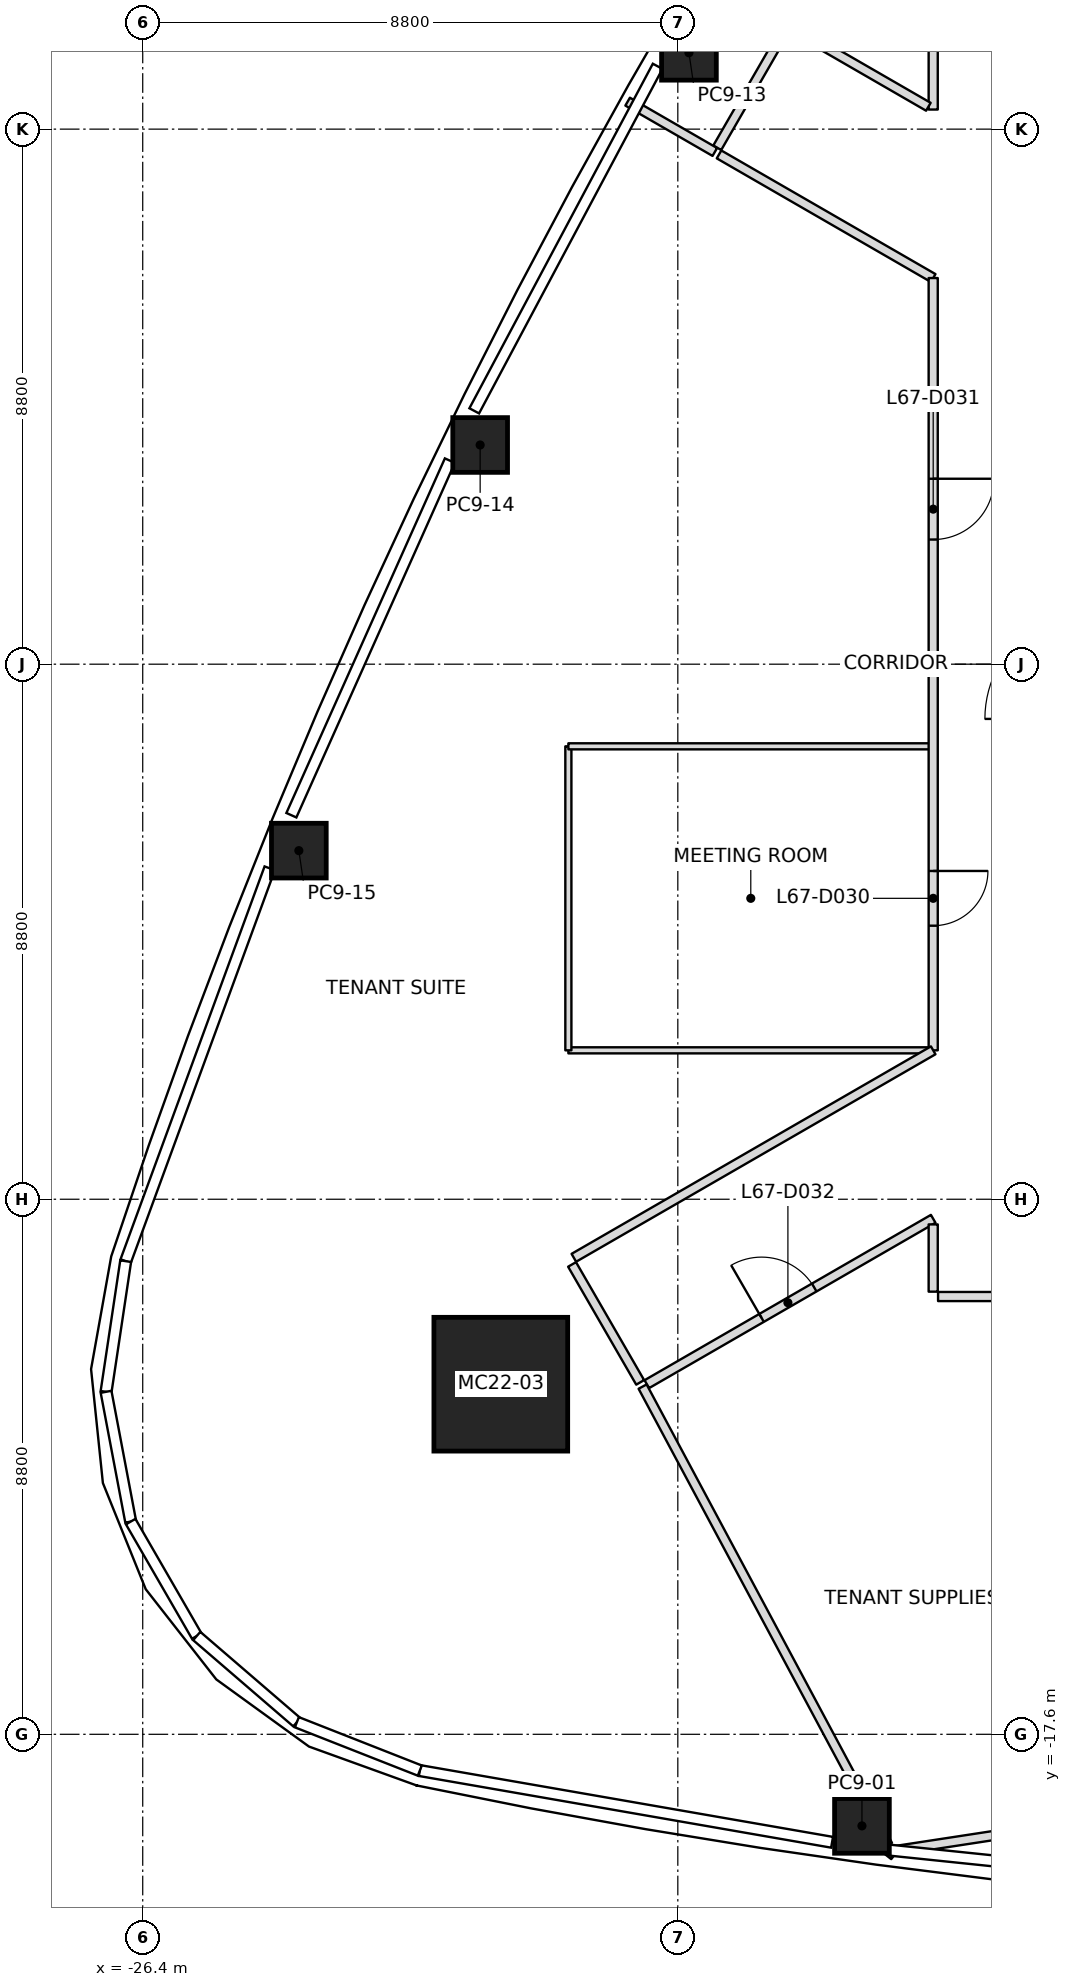
"""IFC4 building model, lengths in metres.
Left out: names, types, materials, properties, quantities, classifications, styles, units other than length and angle.
Written with IfcOpenShell. Run it as: python <this file> out.ifc"""

import sys

from ifc_helpers import new_model, si_unit, direction, frame, frame_2d, origin, origin_2d, place, context, subcontext, project, spatial, rectangle, extrude, element, fill, save


model = new_model("IFC4")
c1 = context("Model", 3, precision=1e-05, world=origin(), true_north=direction((0.0, 1.0)))
c2 = subcontext(c1, "Body", "Model", "MODEL_VIEW")
j1 = project(units=[si_unit("LENGTHUNIT", "METRE"), si_unit("PLANEANGLEUNIT", "RADIAN")], contexts=[c1])
p1 = place(None, origin())
s1 = spatial("IfcSite", under=j1, at=p1, CompositionType="ELEMENT")
p2 = place(p1, origin())
s2 = spatial("IfcBuilding", under=s1, at=p2, CompositionType="ELEMENT")
p3 = place(p2, frame((0.0, 0.0, 295.0)))
s3 = spatial("IfcBuildingStorey", under=s2, at=p3, CompositionType="ELEMENT", Elevation=295.0)
p4 = place(p3, frame((-20.511, -11.842, 0.0), z_axis=(0.027695790401, 0.015983033227, 0.999488612163), x_axis=(0.999616398022, -0.00044283261, -0.027692249912)))
e1 = element("IfcColumn", 1, at=p4, inside=s3, PredefinedType="COLUMN", context=c2, shape_type="SweptSolid", body=[
    extrude(rectangle(XDim=2.2, YDim=2.2, at=origin_2d()), origin(), (0.0, 0.0, 1.0), 4.002),
])
p5 = place(p3, frame((-14.572, -19.106, 0.0), z_axis=(0.017452456582, 0.010373837829, 0.999793876381), x_axis=(-0.990378020891, 0.137476485658, 0.015861640101)))
e2 = element("IfcColumn", 2, at=p5, inside=s3, PredefinedType="COLUMN", context=c2, shape_type="SweptSolid", body=[
    extrude(rectangle(XDim=0.9, YDim=0.9, at=origin_2d()), origin(), (0.0, 0.0, 1.0), 4.001),
])
p6 = place(p3, frame((-17.417, 10.056, 0.0), z_axis=(0.009887052741, -0.005675900648, 0.999935013058), x_axis=(0.49997556095, 0.866039512773, -2.7732311e-05)))
e3 = element("IfcColumn", 3, at=p6, inside=s3, PredefinedType="COLUMN", context=c2, shape_type="SweptSolid", body=[
    extrude(rectangle(XDim=0.9, YDim=0.9, at=origin_2d()), origin(), (0.0, 0.0, 1.0), 4.0),
])
p7 = place(p3, frame((-20.851, 3.605, 0.0), z_axis=(0.013975659066, 0.001952930525, 0.999900428551), x_axis=(0.439175149481, 0.89836678962, -0.007892996002)))
e4 = element("IfcColumn", 4, at=p7, inside=s3, PredefinedType="COLUMN", context=c2, shape_type="SweptSolid", body=[
    extrude(rectangle(XDim=0.9, YDim=0.9, at=origin_2d()), origin(), (0.0, 0.0, 1.0), 4.0),
])
p8 = place(p3, frame((-23.833, -3.066, 0.0), z_axis=(0.017696547774, 0.0099466803, 0.999793926641), x_axis=(0.376296308492, 0.926363330433, -0.015876657246)))
e5 = element("IfcColumn", 5, at=p8, inside=s3, PredefinedType="COLUMN", context=c2, shape_type="SweptSolid", body=[
    extrude(rectangle(XDim=0.9, YDim=0.9, at=origin_2d()), origin(), (0.0, 0.0, 1.0), 4.001),
])
p9 = place(p3, frame((-16.991, 8.424, 0.0), z_axis=(0.0, 0.0, 1.0), x_axis=(-0.866011236992, 0.500024536802, 0.0)))
e6 = element("IfcWall", 6, at=p9, inside=s3, PredefinedType="PARTITIONING", context=c2, shape_type="SweptSolid", body=[
    extrude(rectangle(XDim=1.656, YDim=0.15, at=frame_2d((0.828, 0.0))), origin(), (0.0, 0.0, 1.0), 3.234),
])
p10 = place(p3, frame((-18.179, -11.881, 0.0), z_axis=(0.0, 0.0, 1.0), x_axis=(0.471890219443, -0.881657314831, 0.0)))
e7 = element("IfcWall", 7, at=p10, inside=s3, PredefinedType="PARTITIONING", context=c2, shape_type="SweptSolid", body=[
    extrude(rectangle(XDim=8.552, YDim=0.15, at=frame_2d((4.276, 0.0))), origin(), (0.0, 0.0, 1.0), 3.45),
])
p11 = place(p3, frame((-10.2, -18.927, 0.0), z_axis=(0.0, 0.0, 1.0), x_axis=(-0.988493450788, -0.151263669625, 0.0)))
e8 = element("IfcWall", 8, at=p11, inside=s3, PredefinedType="PARTITIONING", context=c2, shape_type="SweptSolid", body=[
    extrude(rectangle(XDim=3.838, YDim=0.15, at=frame_2d((1.919, 0.0))), origin(), (0.0, 0.0, 1.0), 3.234),
])
p12 = place(p3, frame((-14.044, -19.594, 0.0), z_axis=(0.0, 0.0, 1.0), x_axis=(-0.785084693937, 0.619388426875, 0.0)))
e9 = element("IfcWall", 9, at=p12, inside=s3, PredefinedType="PARTITIONING", context=c2, shape_type="SweptSolid", body=[
    extrude(rectangle(XDim=0.186, YDim=0.15, at=frame_2d((0.093, 0.0))), origin(), (0.0, 0.0, 1.0), 3.45),
])
p13 = place(p3, frame((-19.339, -9.872, 0.0), z_axis=(0.0, 0.0, 1.0), x_axis=(0.500030632641, -0.866007717299, 0.0)))
e10 = element("IfcWall", 10, at=p13, inside=s3, PredefinedType="PARTITIONING", context=c2, shape_type="SweptSolid", body=[
    extrude(rectangle(XDim=2.24, YDim=0.15, at=frame_2d((1.12, 0.0))), origin(), (0.0, 0.0, 1.0), 3.233),
])
p14 = place(p3, frame((-16.922, 8.384, 0.0), z_axis=(0.0, 0.0, 1.0), x_axis=(0.866036641328, -0.499980535498, 0.0)))
e11 = element("IfcWall", 11, at=p14, inside=s3, PredefinedType="PARTITIONING", context=c2, shape_type="SweptSolid", body=[
    extrude(rectangle(XDim=4.067, YDim=0.15, at=frame_2d((2.034, 0.0))), origin(), (0.0, 0.0, 1.0), 3.45),
])
p15 = place(p3, frame((-13.4, 6.351, 0.0), z_axis=(0.0, 0.0, 1.0), x_axis=(0.0, -1.0, 0.0)))
e12 = element("IfcWall", 12, at=p15, inside=s3, PredefinedType="PARTITIONING", context=c2, shape_type="SweptSolid", body=[
    extrude(rectangle(XDim=12.702, YDim=0.15, at=frame_2d((6.351, 0.0))), origin(), (0.0, 0.0, 1.0), 3.317),
])
p16 = place(p15, frame((9.752, 0.0, 0.0)))
e13 = element("IfcOpeningElement", 13, at=p16, cuts=e12, PredefinedType="OPENING", context=c2, shape_type="SweptSolid", body=[
    extrude(rectangle(XDim=0.9, YDim=2.1, at=frame_2d((0.45, 1.05))), frame((0.0, 0.075, 0.0), z_axis=(0.0, -1.0, 0.0), x_axis=(1.0, 0.0, 0.0)), (0.0, 0.0, 1.0), 0.15),
])
p17 = place(p15, frame((3.301, 0.0, 0.0)))
e14 = element("IfcOpeningElement", 14, at=p17, cuts=e12, PredefinedType="OPENING", context=c2, shape_type="SweptSolid", body=[
    extrude(rectangle(XDim=1.0, YDim=2.1, at=frame_2d((0.5, 1.05))), frame((0.0, 0.075, 0.0), z_axis=(0.0, -1.0, 0.0), x_axis=(1.0, 0.0, 0.0)), (0.0, 0.0, 1.0), 0.15),
])
p18 = place(p3, frame((-13.4, -6.351, 0.0), z_axis=(0.0, 0.0, 1.0), x_axis=(-0.866024132967, -0.500002201113, 0.0)))
e15 = element("IfcWall", 15, at=p18, inside=s3, PredefinedType="PARTITIONING", context=c2, shape_type="SweptSolid", body=[
    extrude(rectangle(XDim=6.824, YDim=0.15, at=frame_2d((3.412, 0.0))), origin(), (0.0, 0.0, 1.0), 3.317),
])
p19 = place(p3, frame((-18.11, -11.841, 0.0), z_axis=(0.0, 0.0, 1.0), x_axis=(0.866030095999, 0.499991872758, 0.0)))
e16 = element("IfcWall", 16, at=p19, inside=s3, PredefinedType="PARTITIONING", context=c2, shape_type="SweptSolid", body=[
    extrude(rectangle(XDim=5.438, YDim=0.15, at=frame_2d((2.719, 0.0))), origin(), (0.0, 0.0, 1.0), 3.233),
])
p20 = place(p19, frame((2.179, 0.0, 0.0)))
e17 = element("IfcOpeningElement", 17, at=p20, cuts=e16, PredefinedType="OPENING", context=c2, shape_type="SweptSolid", body=[
    extrude(rectangle(XDim=1.0, YDim=2.1, at=frame_2d((0.5, 1.05))), frame((0.0, 0.075, 0.0), z_axis=(0.0, -1.0, 0.0), x_axis=(1.0, 0.0, 0.0)), (0.0, 0.0, 1.0), 0.15),
])
p21 = place(p3, frame((-13.4, -9.214, 0.0), z_axis=(0.0, 0.0, 1.0), x_axis=(0.0, -1.0, 0.0)))
e18 = element("IfcWall", 18, at=p21, inside=s3, PredefinedType="PARTITIONING", context=c2, shape_type="SweptSolid", body=[
    extrude(rectangle(XDim=1.106, YDim=0.15, at=frame_2d((0.553, 0.0))), origin(), (0.0, 0.0, 1.0), 3.233),
])
p22 = place(p3, frame((-15.831, 10.434, 0.0), z_axis=(0.0, 0.0, 1.0), x_axis=(-0.500030632641, -0.866007717299, 0.0)))
e19 = element("IfcWall", 19, at=p22, inside=s3, PredefinedType="PARTITIONING", context=c2, shape_type="SweptSolid", body=[
    extrude(rectangle(XDim=2.24, YDim=0.15, at=frame_2d((1.12, 0.0))), origin(), (0.0, 0.0, 1.0), 3.45),
])
p23 = place(p3, frame((-13.4, 10.32, 0.0), z_axis=(0.0, 0.0, 1.0), x_axis=(0.0, -1.0, 0.0)))
e20 = element("IfcWall", 20, at=p23, inside=s3, PredefinedType="PARTITIONING", context=c2, shape_type="SweptSolid", body=[
    extrude(rectangle(XDim=1.198, YDim=0.15, at=frame_2d((0.599, 0.0))), origin(), (0.0, 0.0, 1.0), 3.45),
])
p24 = place(p3, frame((-13.479, 9.168, 0.0), z_axis=(0.0, 0.0, 1.0), x_axis=(-0.8660301764, 0.499991733496, 0.0)))
e21 = element("IfcWall", 21, at=p24, inside=s3, PredefinedType="PARTITIONING", context=c2, shape_type="SweptSolid", body=[
    extrude(rectangle(XDim=2.59, YDim=0.15, at=frame_2d((1.295, 0.0))), origin(), (0.0, 0.0, 1.0), 3.45),
])
p25 = place(p3, frame((-13.32, -10.4, 0.0), z_axis=(0.0, 0.0, 1.0), x_axis=(1.0, 0.0, 0.0)))
e22 = element("IfcWall", 22, at=p25, inside=s3, PredefinedType="PARTITIONING", context=c2, shape_type="SweptSolid", body=[
    extrude(rectangle(XDim=12.12, YDim=0.15, at=frame_2d((6.06, 0.0))), origin(), (0.0, 0.0, 1.0), 3.393),
])
p26 = place(p25, frame((7.12, 0.0, 0.0)))
e23 = element("IfcOpeningElement", 23, at=p26, cuts=e22, PredefinedType="OPENING", context=c2, shape_type="SweptSolid", body=[
    extrude(rectangle(XDim=1.0, YDim=2.1, at=frame_2d((0.5, 1.05))), frame((0.0, 0.075, 0.0), z_axis=(0.0, -1.0, 0.0), x_axis=(1.0, 0.0, 0.0)), (0.0, 0.0, 1.0), 0.15),
])
p27 = place(p3, frame((-13.46, -6.351, 0.0), z_axis=(0.0, 0.0, 1.0), x_axis=(-1.0, 0.0, 0.0)))
e24 = element("IfcWall", 24, at=p27, inside=s3, PredefinedType="PARTITIONING", context=c2, shape_type="SweptSolid", body=[
    extrude(rectangle(XDim=5.94, YDim=0.1, at=frame_2d((2.97, 0.0))), origin(), (0.0, 0.0, 1.0), 3.317),
])
p28 = place(p3, frame((-19.4, -6.351, 0.0), z_axis=(0.0, 0.0, 1.0), x_axis=(0.0, 1.0, 0.0)))
e25 = element("IfcWall", 25, at=p28, inside=s3, PredefinedType="PARTITIONING", context=c2, shape_type="SweptSolid", body=[
    extrude(rectangle(XDim=5.0, YDim=0.1, at=frame_2d((2.5, 0.0))), origin(), (0.0, 0.0, 1.0), 3.317),
])
p29 = place(p3, frame((-19.4, -1.351, 0.0), z_axis=(0.0, 0.0, 1.0), x_axis=(1.0, 0.0, 0.0)))
e26 = element("IfcWall", 26, at=p29, inside=s3, PredefinedType="PARTITIONING", context=c2, shape_type="SweptSolid", body=[
    extrude(rectangle(XDim=5.97, YDim=0.1, at=frame_2d((2.985, 0.0))), origin(), (0.0, 0.0, 1.0), 3.317),
])
p30 = place(p16, origin())
e27 = element("IfcDoor", 27, at=p30, inside=s3, OperationType="SINGLE_SWING_LEFT", PredefinedType="DOOR", context=c2, shape_type="SweptSolid", body=[
    extrude(rectangle(XDim=0.9, YDim=2.1, at=frame_2d((0.45, 1.05))), frame((0.0, 0.025, 0.0), z_axis=(0.0, -1.0, 0.0), x_axis=(1.0, 0.0, 0.0)), (0.0, 0.0, 1.0), 0.05),
])
fill(e13, e27)
p31 = place(p17, origin())
e28 = element("IfcDoor", 28, at=p31, inside=s3, OperationType="SINGLE_SWING_RIGHT", PredefinedType="DOOR", context=c2, shape_type="SweptSolid", body=[
    extrude(rectangle(XDim=1.0, YDim=2.1, at=frame_2d((0.5, 1.05))), frame((0.0, 0.025, 0.0), z_axis=(0.0, -1.0, 0.0), x_axis=(1.0, 0.0, 0.0)), (0.0, 0.0, 1.0), 0.05),
])
fill(e14, e28)
p32 = place(p20, origin())
e29 = element("IfcDoor", 29, at=p32, inside=s3, OperationType="SINGLE_SWING_LEFT", PredefinedType="DOOR", context=c2, shape_type="SweptSolid", body=[
    extrude(rectangle(XDim=1.0, YDim=2.1, at=frame_2d((0.5, 1.05))), frame((0.0, 0.025, 0.0), z_axis=(0.0, -1.0, 0.0), x_axis=(1.0, 0.0, 0.0)), (0.0, 0.0, 1.0), 0.05),
])
fill(e17, e29)
save(model, sys.argv[1])
